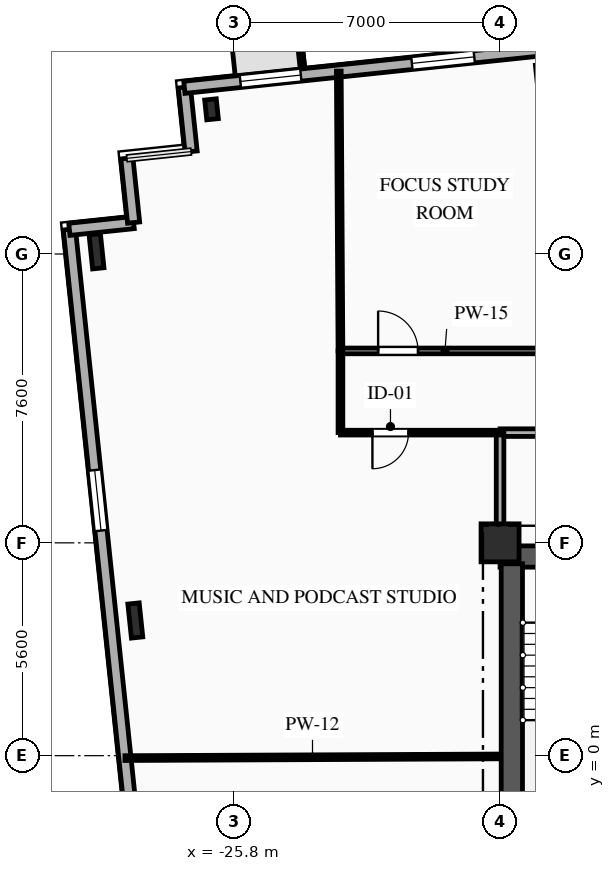
"""IFC4 building model, lengths in metres.
Left out: names, types, materials, properties, quantities, classifications, styles, units other than length and angle.
Written with IfcOpenShell. Run it as: python <this file> out.ifc"""

import sys

from ifc_helpers import new_model, si_unit, direction, frame, frame_2d, origin, origin_2d, place, context, subcontext, project, spatial, rectangle, i_section, extrude, element, fill, save


model = new_model("IFC4")
c1 = context("Model", 3, precision=1e-05, world=origin(), true_north=direction((0.0, 1.0)))
c2 = subcontext(c1, "Body", "Model", "MODEL_VIEW")
j1 = project(units=[si_unit("LENGTHUNIT", "METRE"), si_unit("PLANEANGLEUNIT", "RADIAN")], contexts=[c1])
p1 = place(None, origin())
s1 = spatial("IfcSite", under=j1, at=p1, CompositionType="ELEMENT")
p2 = place(p1, origin())
s2 = spatial("IfcBuilding", under=s1, at=p2, CompositionType="ELEMENT")
p3 = place(p2, frame((0.0, 0.0, 92.4)))
s3 = spatial("IfcBuildingStorey", under=s2, at=p3, CompositionType="ELEMENT", Elevation=92.4)
p4 = place(p3, frame((-18.8, 5.6, 0.0), z_axis=(0.0, 0.0, 1.0), x_axis=(1.0, 0.0, 0.0)))
e1 = element("IfcColumn", 1, at=p4, inside=s3, PredefinedType="COLUMN", context=c2, shape_type="SweptSolid", body=[
    extrude(rectangle(XDim=1.0, YDim=1.0, at=origin_2d()), origin(), (0.0, 0.0, 1.0), 3.35),
])
p5 = place(p3, frame((-26.393, 17.007, 0.0), z_axis=(0.0, 0.0, 1.0), x_axis=(0.994521895368, 0.104528463268, 0.0)))
e2 = element("IfcColumn", 2, at=p5, inside=s3, PredefinedType="COLUMN", context=c2, shape_type="SweptSolid", body=[
    extrude(i_section(OverallWidth=0.306, OverallDepth=0.524, WebThickness=0.021, FlangeThickness=0.04, FilletRadius=0.027, at=origin_2d()), origin(), (0.0, 0.0, 1.0), 3.35),
])
for number, where, z_axis, x_axis in (
    (3, (-29.419, 13.271, 0.0), (0.0, 0.0, 1.0), (0.995, 0.105, 0.0)),
    (4, (-28.398, 3.557, 0.0), (0.0, 0.0, 1.0), (0.995, 0.105, 0.0)),
):
    element("IfcColumn", number, at=place(p3, frame(where, z_axis=z_axis, x_axis=x_axis)), inside=s3, PredefinedType="COLUMN", context=c2, shape_type="SweptSolid", body=[
        extrude(i_section(OverallWidth=0.3, OverallDepth=0.9, WebThickness=0.019, FlangeThickness=0.035, FilletRadius=0.03, at=origin_2d()), origin(), (0.0, 0.0, 1.0), 3.35),
    ])
p6 = place(p3, frame((-26.935, -16.583, 0.0), z_axis=(0.0, 0.0, 1.0), x_axis=(-0.104524887486, 0.994522271192, 0.0)))
e5 = element("IfcWall", 5, at=p6, inside=s3, PredefinedType="SOLIDWALL", context=c2, shape_type="SweptSolid", body=[
    extrude(rectangle(XDim=30.6, YDim=0.32, at=frame_2d((15.3, 0.0))), origin(), (0.0, 0.0, 1.0), 3.045),
])
p7 = place(p6, frame((7.746, 0.0, 0.85)))
e6 = element("IfcOpeningElement", 6, at=p7, cuts=e5, PredefinedType="OPENING", context=c2, shape_type="SweptSolid", body=[
    extrude(rectangle(XDim=1.65, YDim=1.85, at=frame_2d((0.825, 0.925))), frame((0.0, 0.17, 0.0), z_axis=(0.0, -1.0, 0.0), x_axis=(1.0, 0.0, 0.0)), (0.0, 0.0, 1.0), 0.34),
])
p8 = place(p6, frame((22.631, 0.0, 0.85)))
e7 = element("IfcOpeningElement", 7, at=p8, cuts=e5, PredefinedType="OPENING", context=c2, shape_type="SweptSolid", body=[
    extrude(rectangle(XDim=1.6, YDim=1.85, at=frame_2d((0.8, 0.925))), frame((0.0, 0.17, 0.0), z_axis=(0.0, -1.0, 0.0), x_axis=(1.0, 0.0, 0.0)), (0.0, 0.0, 1.0), 0.34),
])
for number, where, z_axis, x_axis in (
    (8, (-30.133, 13.849, 0.0), (0.0, 0.0, 1.0), (0.995, 0.104, 0.0)),
    (9, (-28.443, 14.027, 0.0), (0.0, 0.0, 1.0), (-0.105, 0.995, 0.0)),
    (10, (-26.93, 15.895, 0.0), (0.0, 0.0, 1.0), (-0.105, 0.995, 0.0)),
):
    element("IfcWall", number, at=place(p3, frame(where, z_axis=z_axis, x_axis=x_axis)), inside=s3, PredefinedType="SOLIDWALL", context=c2, shape_type="SweptSolid", body=[
        extrude(rectangle(XDim=1.7, YDim=0.32, at=frame_2d((0.85, 0.0))), origin(), (0.0, 0.0, 1.0), 3.045),
    ])
p9 = place(p3, frame((-27.107, 17.586, 0.0), z_axis=(0.0, 0.0, 1.0), x_axis=(0.994521628355, 0.104531003701, 0.0)))
e11 = element("IfcWall", 11, at=p9, inside=s3, PredefinedType="SOLIDWALL", context=c2, shape_type="SweptSolid", body=[
    extrude(rectangle(XDim=53.8, YDim=0.32, at=frame_2d((26.9, 0.0))), origin(), (0.0, 0.0, 1.0), 3.045),
])
p10 = place(p9, frame((1.482, 0.0, 0.85)))
e12 = element("IfcOpeningElement", 12, at=p10, cuts=e11, PredefinedType="OPENING", context=c2, shape_type="SweptSolid", body=[
    extrude(rectangle(XDim=1.6, YDim=1.85, at=frame_2d((0.8, 0.925))), frame((0.0, 0.17, 0.0), z_axis=(0.0, -1.0, 0.0), x_axis=(1.0, 0.0, 0.0)), (0.0, 0.0, 1.0), 0.34),
])
p11 = place(p9, frame((6.02, 0.0, 0.85)))
e13 = element("IfcOpeningElement", 13, at=p11, cuts=e11, PredefinedType="OPENING", context=c2, shape_type="SweptSolid", body=[
    extrude(rectangle(XDim=1.65, YDim=1.85, at=frame_2d((0.825, 0.925))), frame((0.0, 0.17, 0.0), z_axis=(0.0, -1.0, 0.0), x_axis=(1.0, 0.0, 0.0)), (0.0, 0.0, 1.0), 0.34),
])
p12 = place(p9, frame((11.584, 0.0, 0.85)))
e14 = element("IfcOpeningElement", 14, at=p12, cuts=e11, PredefinedType="OPENING", context=c2, shape_type="SweptSolid", body=[
    extrude(rectangle(XDim=1.65, YDim=1.85, at=frame_2d((0.825, 0.925))), frame((0.0, 0.17, 0.0), z_axis=(0.0, -1.0, 0.0), x_axis=(1.0, 0.0, 0.0)), (0.0, 0.0, 1.0), 0.34),
])
p13 = place(p9, frame((21.336, 0.0, 0.85)))
e15 = element("IfcOpeningElement", 15, at=p13, cuts=e11, PredefinedType="OPENING", context=c2, shape_type="SweptSolid", body=[
    extrude(rectangle(XDim=1.6, YDim=1.85, at=frame_2d((0.8, 0.925))), frame((0.0, 0.17, 0.0), z_axis=(0.0, -1.0, 0.0), x_axis=(1.0, 0.0, 0.0)), (0.0, 0.0, 1.0), 0.34),
])
p14 = place(p9, frame((31.404, 0.0, 0.85)))
e16 = element("IfcOpeningElement", 16, at=p14, cuts=e11, PredefinedType="OPENING", context=c2, shape_type="SweptSolid", body=[
    extrude(rectangle(XDim=2.2, YDim=1.85, at=frame_2d((1.1, 0.925))), frame((0.0, 0.17, 0.0), z_axis=(0.0, -1.0, 0.0), x_axis=(1.0, 0.0, 0.0)), (0.0, 0.0, 1.0), 0.34),
])
p15 = place(p9, frame((40.486, 0.0, 0.85)))
e17 = element("IfcOpeningElement", 17, at=p15, cuts=e11, PredefinedType="OPENING", context=c2, shape_type="SweptSolid", body=[
    extrude(rectangle(XDim=1.65, YDim=1.85, at=frame_2d((0.825, 0.925))), frame((0.0, 0.17, 0.0), z_axis=(0.0, -1.0, 0.0), x_axis=(1.0, 0.0, 0.0)), (0.0, 0.0, 1.0), 0.34),
])
p16 = place(p9, frame((46.53, 0.0, 0.85)))
e18 = element("IfcOpeningElement", 18, at=p16, cuts=e11, PredefinedType="OPENING", context=c2, shape_type="SweptSolid", body=[
    extrude(rectangle(XDim=1.65, YDim=1.85, at=frame_2d((0.825, 0.925))), frame((0.0, 0.17, 0.0), z_axis=(0.0, -1.0, 0.0), x_axis=(1.0, 0.0, 0.0)), (0.0, 0.0, 1.0), 0.34),
])
p17 = place(p9, frame((51.054, 0.0, 0.85)))
e19 = element("IfcOpeningElement", 19, at=p17, cuts=e11, PredefinedType="OPENING", context=c2, shape_type="SweptSolid", body=[
    extrude(rectangle(XDim=1.65, YDim=1.85, at=frame_2d((0.825, 0.925))), frame((0.0, 0.17, 0.0), z_axis=(0.0, -1.0, 0.0), x_axis=(1.0, 0.0, 0.0)), (0.0, 0.0, 1.0), 0.34),
])
p18 = place(p3, frame((-18.8, 5.24, 0.0), z_axis=(0.0, 0.0, 1.0), x_axis=(1.0, 0.0, 0.0)))
e20 = element("IfcWall", 20, at=p18, inside=s3, PredefinedType="SHEAR", context=c2, shape_type="SweptSolid", body=[
    extrude(rectangle(XDim=9.6, YDim=0.56, at=frame_2d((4.8, 0.0))), origin(), (0.0, 0.0, 1.0), 3.045),
])
p19 = place(p18, frame((1.55, 0.0, 0.0)))
e21 = element("IfcOpeningElement", 21, at=p19, cuts=e20, PredefinedType="OPENING", context=c2, shape_type="SweptSolid", body=[
    extrude(rectangle(XDim=1.1, YDim=2.15, at=frame_2d((0.55, 1.075))), frame((0.0, 0.29, 0.0), z_axis=(0.0, -1.0, 0.0), x_axis=(1.0, 0.0, 0.0)), (0.0, 0.0, 1.0), 0.58),
])
p20 = place(p18, frame((4.775, 0.0, 0.0)))
e22 = element("IfcOpeningElement", 22, at=p20, cuts=e20, PredefinedType="OPENING", context=c2, shape_type="SweptSolid", body=[
    extrude(rectangle(XDim=1.05, YDim=2.1, at=frame_2d((0.525, 1.05))), frame((0.0, 0.29, 0.0), z_axis=(0.0, -1.0, 0.0), x_axis=(1.0, 0.0, 0.0)), (0.0, 0.0, 1.0), 0.58),
])
p21 = place(p3, frame((-18.49, -5.05, 0.0), z_axis=(0.0, 0.0, 1.0), x_axis=(0.0, 1.0, 0.0)))
e23 = element("IfcWall", 23, at=p21, inside=s3, PredefinedType="SHEAR", context=c2, shape_type="SweptSolid", body=[
    extrude(rectangle(XDim=10.1, YDim=0.56, at=frame_2d((5.05, 0.0))), origin(), (0.0, 0.0, 1.0), 3.045),
])
p22 = place(p3, frame((-12.0, 8.5, 0.0), z_axis=(0.0, 0.0, 1.0), x_axis=(-1.0, 0.0, 0.0)))
e24 = element("IfcWall", 24, at=p22, inside=s3, PredefinedType="PARTITIONING", context=c2, shape_type="SweptSolid", body=[
    extrude(rectangle(XDim=6.8, YDim=0.2, at=frame_2d((3.4, 0.0))), origin(), (0.0, 0.0, 1.0), 3.045),
])
p23 = place(p22, frame((1.715, 0.0, 0.0)))
e25 = element("IfcOpeningElement", 25, at=p23, cuts=e24, PredefinedType="OPENING", context=c2, shape_type="SweptSolid", body=[
    extrude(rectangle(XDim=1.1, YDim=2.15, at=frame_2d((0.55, 1.075))), frame((0.0, 0.11, 0.0), z_axis=(0.0, -1.0, 0.0), x_axis=(1.0, 0.0, 0.0)), (0.0, 0.0, 1.0), 0.22),
])
p24 = place(p3, frame((-18.8, 8.5, 0.0), z_axis=(0.0, 0.0, 1.0), x_axis=(0.0, -1.0, 0.0)))
e26 = element("IfcWall", 26, at=p24, inside=s3, PredefinedType="PARTITIONING", context=c2, shape_type="SweptSolid", body=[
    extrude(rectangle(XDim=2.9, YDim=0.2, at=frame_2d((1.45, 0.0))), origin(), (0.0, 0.0, 1.0), 2.53),
])
p25 = place(p3, frame((-18.8, 8.5, 0.0), z_axis=(0.0, 0.0, 1.0), x_axis=(-1.0, 0.0, 0.0)))
e27 = element("IfcWall", 27, at=p25, inside=s3, PredefinedType="PARTITIONING", context=c2, shape_type="SweptSolid", body=[
    extrude(rectangle(XDim=4.2, YDim=0.125, at=frame_2d((2.1, 0.0))), origin(), (0.0, 0.0, 1.0), 3.045),
])
p26 = place(p25, frame((2.409, 0.0, 0.0)))
e28 = element("IfcOpeningElement", 28, at=p26, cuts=e27, PredefinedType="OPENING", context=c2, shape_type="SweptSolid", body=[
    extrude(rectangle(XDim=0.95, YDim=2.1, at=frame_2d((0.475, 1.05))), frame((0.0, 0.073, 0.0), z_axis=(0.0, -1.0, 0.0), x_axis=(1.0, 0.0, 0.0)), (0.0, 0.0, 1.0), 0.145),
])
p27 = place(p3, frame((-23.0, 8.5, 0.0), z_axis=(0.0, 0.0, 1.0), x_axis=(0.0, 1.0, 0.0)))
e29 = element("IfcWall", 29, at=p27, inside=s3, PredefinedType="PARTITIONING", context=c2, shape_type="SweptSolid", body=[
    extrude(rectangle(XDim=2.15, YDim=0.125, at=frame_2d((1.075, 0.0))), origin(), (0.0, 0.0, 1.0), 3.045),
])
p28 = place(p3, frame((-23.0, 10.65, 0.0), z_axis=(0.0, 0.0, 1.0), x_axis=(1.0, 0.0, 0.0)))
e30 = element("IfcWall", 30, at=p28, inside=s3, PredefinedType="PARTITIONING", context=c2, shape_type="SweptSolid", body=[
    extrude(rectangle(XDim=5.5, YDim=0.15, at=frame_2d((2.75, 0.0))), origin(), (0.0, 0.0, 1.0), 3.045),
])
p29 = place(p28, frame((0.991, 0.0, 0.0)))
e31 = element("IfcOpeningElement", 31, at=p29, cuts=e30, PredefinedType="OPENING", context=c2, shape_type="SweptSolid", body=[
    extrude(rectangle(XDim=1.05, YDim=2.15, at=frame_2d((0.525, 1.075))), frame((0.0, 0.085, 0.0), z_axis=(0.0, -1.0, 0.0), x_axis=(1.0, 0.0, 0.0)), (0.0, 0.0, 1.0), 0.17),
])
p30 = place(p3, frame((-28.671, -0.064, 0.0), z_axis=(0.0, 0.0, 1.0), x_axis=(0.999990089865, 0.004451985263, 0.0)))
e32 = element("IfcWall", 32, at=p30, inside=s3, PredefinedType="PARTITIONING", context=c2, shape_type="SweptSolid", body=[
    extrude(rectangle(XDim=9.871, YDim=0.125, at=frame_2d((4.936, 0.0))), origin(), (0.0, 0.0, 1.0), 3.045),
])
p31 = place(p3, frame((-23.044, 18.013, 0.0), z_axis=(0.0, 0.0, 1.0), x_axis=(0.005968459246, -0.999982188588, 0.0)))
e33 = element("IfcWall", 33, at=p31, inside=s3, PredefinedType="PARTITIONING", context=c2, shape_type="SweptSolid", body=[
    extrude(rectangle(XDim=7.363, YDim=0.125, at=frame_2d((3.682, 0.0))), origin(), (0.0, 0.0, 1.0), 3.045),
])
p32 = place(p8, origin())
e34 = element("IfcWindow", 34, at=p32, inside=s3, PartitioningType="SINGLE_PANEL", PredefinedType="WINDOW", context=c2, shape_type="SweptSolid", body=[
    extrude(rectangle(XDim=1.6, YDim=1.85, at=frame_2d((0.8, 0.925))), frame((0.0, 0.03, 0.0), z_axis=(0.0, -1.0, 0.0), x_axis=(1.0, 0.0, 0.0)), (0.0, 0.0, 1.0), 0.06),
])
fill(e7, e34)
p33 = place(p10, origin())
e35 = element("IfcWindow", 35, at=p33, inside=s3, PartitioningType="SINGLE_PANEL", PredefinedType="WINDOW", context=c2, shape_type="SweptSolid", body=[
    extrude(rectangle(XDim=1.6, YDim=1.85, at=frame_2d((0.8, 0.925))), frame((0.0, 0.03, 0.0), z_axis=(0.0, -1.0, 0.0), x_axis=(1.0, 0.0, 0.0)), (0.0, 0.0, 1.0), 0.06),
])
fill(e12, e35)
p34 = place(p11, origin())
e36 = element("IfcWindow", 36, at=p34, inside=s3, PartitioningType="SINGLE_PANEL", PredefinedType="WINDOW", context=c2, shape_type="SweptSolid", body=[
    extrude(rectangle(XDim=1.65, YDim=1.85, at=frame_2d((0.825, 0.925))), frame((0.0, 0.03, 0.0), z_axis=(0.0, -1.0, 0.0), x_axis=(1.0, 0.0, 0.0)), (0.0, 0.0, 1.0), 0.06),
])
fill(e13, e36)
p35 = place(p26, origin())
e37 = element("IfcDoor", 37, at=p35, inside=s3, OperationType="SINGLE_SWING_RIGHT", PredefinedType="DOOR", context=c2, shape_type="SweptSolid", body=[
    extrude(rectangle(XDim=0.95, YDim=2.1, at=frame_2d((0.475, 1.05))), frame((0.0, 0.025, 0.0), z_axis=(0.0, -1.0, 0.0), x_axis=(1.0, 0.0, 0.0)), (0.0, 0.0, 1.0), 0.05),
])
fill(e28, e37)
p36 = place(p29, origin())
e38 = element("IfcDoor", 38, at=p36, inside=s3, OperationType="SINGLE_SWING_LEFT", PredefinedType="DOOR", context=c2, shape_type="SweptSolid", body=[
    extrude(rectangle(XDim=1.05, YDim=2.15, at=frame_2d((0.525, 1.075))), frame((0.0, 0.025, 0.0), z_axis=(0.0, -1.0, 0.0), x_axis=(1.0, 0.0, 0.0)), (0.0, 0.0, 1.0), 0.05),
])
fill(e31, e38)
save(model, sys.argv[1])
